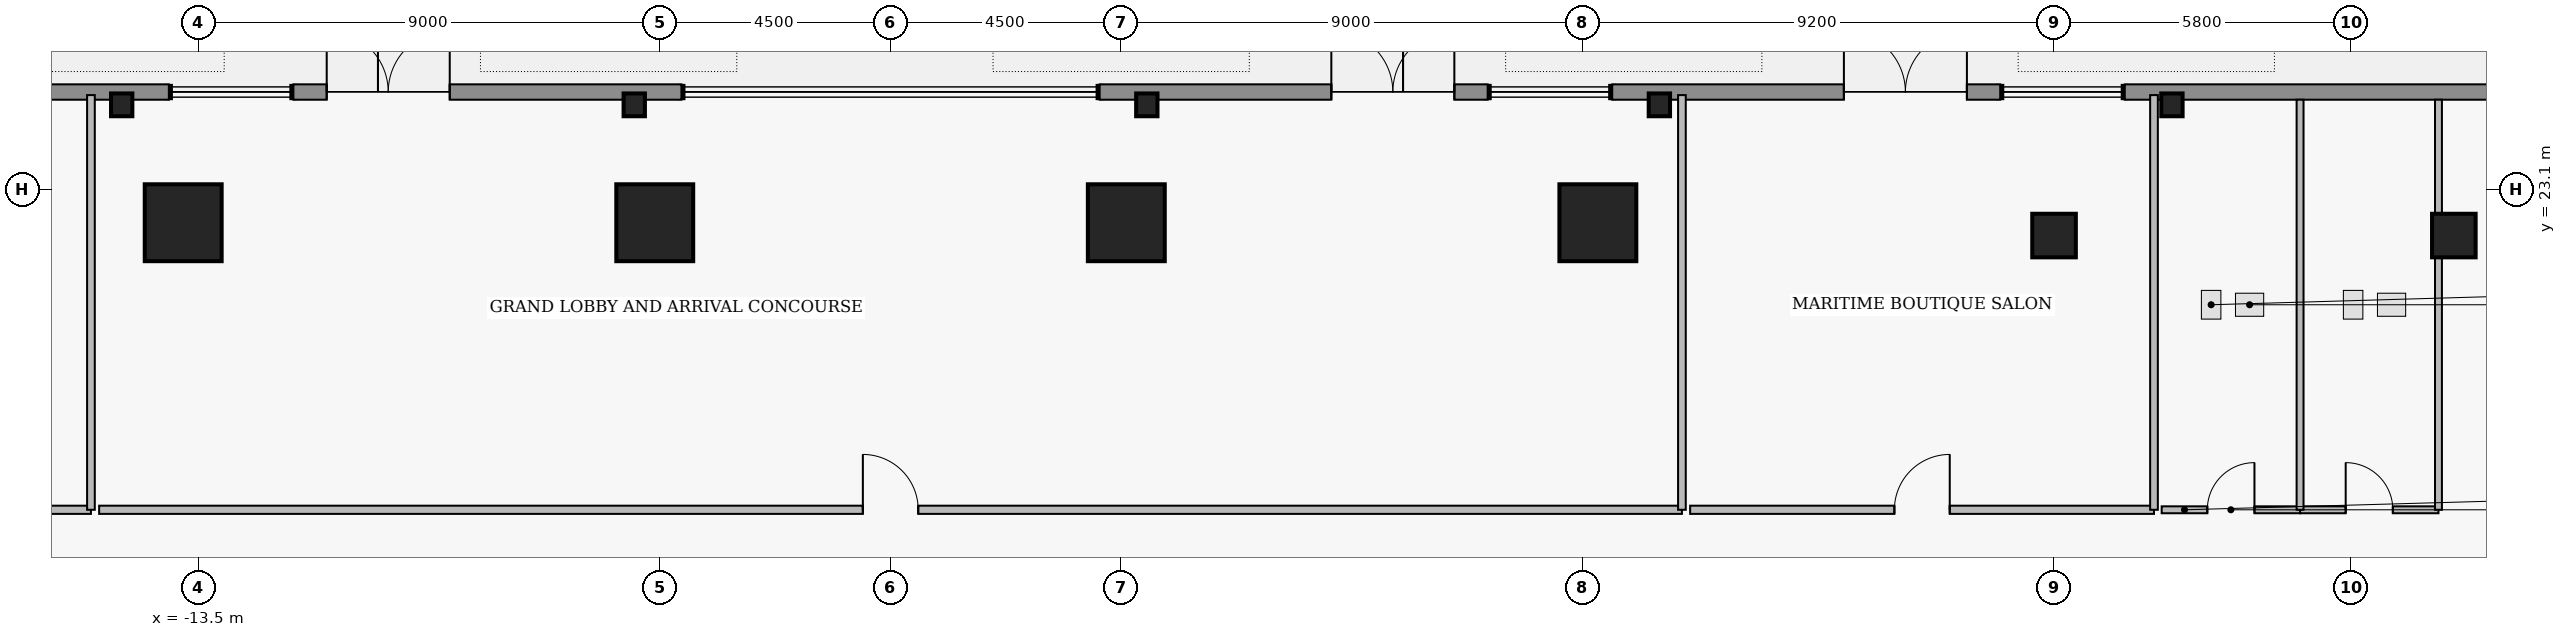
"""IFC4 building model, lengths in metres.
Left out: names, types, materials, properties, quantities, classifications, styles, units other than length and angle.
Written with IfcOpenShell. Run it as: python <this file> out.ifc"""

import sys

from ifc_helpers import new_model, si_unit, direction, frame, frame_2d, origin, origin_2d, place, context, subcontext, project, spatial, rectangle, i_section, extrude, element, fill, save


model = new_model("IFC4")
c1 = context("Model", 3, precision=1e-05, world=origin(), true_north=direction((0.0, 1.0)))
c2 = subcontext(c1, "Body", "Model", "MODEL_VIEW")
j1 = project(units=[si_unit("LENGTHUNIT", "METRE"), si_unit("PLANEANGLEUNIT", "RADIAN")], contexts=[c1])
p1 = place(None, origin())
s1 = spatial("IfcSite", under=j1, at=p1, CompositionType="ELEMENT")
p2 = place(p1, origin())
s2 = spatial("IfcBuilding", under=s1, at=p2, CompositionType="ELEMENT")
p3 = place(p2, origin())
s3 = spatial("IfcBuildingStorey", under=s2, at=p3, CompositionType="ELEMENT", Elevation=0.0)
for number, where, z_axis, x_axis in (
    (1, (-13.8, 22.45, 0.0), (0.0, 0.0, 1.0), (1.0, 0.0, 0.0)),
    (2, (-4.6, 22.45, 0.0), (0.0, 0.0, 1.0), (1.0, 0.0, 0.0)),
    (3, (4.6, 22.45, 0.0), (0.0, 0.0, 1.0), (1.0, 0.0, 0.0)),
    (4, (13.8, 22.45, 0.0), (0.0, 0.0, 1.0), (1.0, 0.0, 0.0)),
):
    element("IfcColumn", number, at=place(p3, frame(where, z_axis=z_axis, x_axis=x_axis)), inside=s3, PredefinedType="COLUMN", context=c2, shape_type="SweptSolid", body=[
        extrude(rectangle(XDim=1.5, YDim=1.5, at=origin_2d()), origin(), (0.0, 0.0, 1.0), 6.0),
    ])
for number, where, z_axis, x_axis in (
    (5, (30.5, 22.2, 0.0), (0.0, 0.0, 1.0), (1.0, 0.0, 0.0)),
    (6, (22.7, 22.2, 0.0), (0.0, 0.0, 1.0), (1.0, 0.0, 0.0)),
):
    element("IfcColumn", number, at=place(p3, frame(where, z_axis=z_axis, x_axis=x_axis)), inside=s3, PredefinedType="COLUMN", context=c2, shape_type="SweptSolid", body=[
        extrude(rectangle(XDim=0.85, YDim=0.85, at=origin_2d()), origin(), (0.0, 0.0, 1.0), 6.0),
    ])
for number, where, z_axis, x_axis in (
    (7, (-15.0, 24.75, -0.27), (0.0, 0.0, 1.0), (1.0, 0.0, 0.0)),
    (8, (-5.0, 24.75, -0.27), (0.0, 0.0, 1.0), (1.0, 0.0, 0.0)),
    (9, (5.0, 24.75, -0.27), (0.0, 0.0, 1.0), (1.0, 0.0, 0.0)),
    (10, (15.0, 24.75, -0.27), (0.0, 0.0, 1.0), (1.0, 0.0, 0.0)),
    (11, (25.0, 24.75, -0.27), (0.0, 0.0, 1.0), (1.0, 0.0, 0.0)),
):
    element("IfcColumn", number, at=place(p3, frame(where, z_axis=z_axis, x_axis=x_axis)), inside=s3, PredefinedType="PILASTER", context=c2, shape_type="SweptSolid", body=[
        extrude(i_section(OverallWidth=0.416, OverallDepth=0.445, WebThickness=0.039, FlangeThickness=0.063, at=origin_2d()), origin(), (0.0, 0.0, 1.0), 6.02),
    ])
p4 = place(p3, frame((-28.35, 25.0, 0.0), z_axis=(0.0, 0.0, 1.0), x_axis=(1.0, 0.0, 0.0)))
e12 = element("IfcWall", 12, at=p4, inside=s3, PredefinedType="STANDARD", context=c2, shape_type="SweptSolid", body=[
    extrude(rectangle(XDim=14.27, YDim=0.3, at=frame_2d((7.135, 0.0))), origin(), (0.0, 0.0, 1.0), 5.75),
])
p5 = place(p4, frame((7.35, 0.0, 0.0)))
e13 = element("IfcOpeningElement", 13, at=p5, cuts=e12, PredefinedType="OPENING", context=c2, shape_type="SweptSolid", body=[
    extrude(rectangle(XDim=2.4, YDim=2.45, at=frame_2d((1.2, 1.225))), frame((0.0, 0.16, 0.0), z_axis=(0.0, -1.0, 0.0), x_axis=(1.0, 0.0, 0.0)), (0.0, 0.0, 1.0), 0.32),
])
p6 = place(p4, frame((4.25, 0.0, 0.9)))
e14 = element("IfcOpeningElement", 14, at=p6, cuts=e12, PredefinedType="OPENING", context=c2, shape_type="SweptSolid", body=[
    extrude(rectangle(XDim=2.4, YDim=2.2, at=frame_2d((1.2, 1.1))), frame((0.0, 0.16, 0.0), z_axis=(0.0, -1.0, 0.0), x_axis=(1.0, 0.0, 0.0)), (0.0, 0.0, 1.0), 0.32),
])
p7 = place(p3, frame((-11.65, 25.0, 0.0), z_axis=(0.0, 0.0, 1.0), x_axis=(1.0, 0.0, 0.0)))
e15 = element("IfcWall", 15, at=p7, inside=s3, PredefinedType="STANDARD", context=c2, shape_type="SweptSolid", body=[
    extrude(rectangle(XDim=7.57, YDim=0.3, at=frame_2d((3.785, 0.0))), origin(), (0.0, 0.0, 1.0), 5.75),
])
p8 = place(p7, frame((0.65, 0.0, 0.0)))
e16 = element("IfcOpeningElement", 16, at=p8, cuts=e15, PredefinedType="OPENING", context=c2, shape_type="SweptSolid", body=[
    extrude(rectangle(XDim=2.4, YDim=2.45, at=frame_2d((1.2, 1.225))), frame((0.0, 0.16, 0.0), z_axis=(0.0, -1.0, 0.0), x_axis=(1.0, 0.0, 0.0)), (0.0, 0.0, 1.0), 0.32),
])
p9 = place(p3, frame((4.08, 25.0, 0.0), z_axis=(0.0, 0.0, 1.0), x_axis=(1.0, 0.0, 0.0)))
e17 = element("IfcWall", 17, at=p9, inside=s3, PredefinedType="STANDARD", context=c2, shape_type="SweptSolid", body=[
    extrude(rectangle(XDim=7.57, YDim=0.3, at=frame_2d((3.785, 0.0))), origin(), (0.0, 0.0, 1.0), 5.75),
])
p10 = place(p9, frame((4.52, 0.0, 0.0)))
e18 = element("IfcOpeningElement", 18, at=p10, cuts=e17, PredefinedType="OPENING", context=c2, shape_type="SweptSolid", body=[
    extrude(rectangle(XDim=2.4, YDim=2.45, at=frame_2d((1.2, 1.225))), frame((0.0, 0.16, 0.0), z_axis=(0.0, -1.0, 0.0), x_axis=(1.0, 0.0, 0.0)), (0.0, 0.0, 1.0), 0.32),
])
p11 = place(p3, frame((14.08, 25.0, 0.0), z_axis=(0.0, 0.0, 1.0), x_axis=(1.0, 0.0, 0.0)))
e19 = element("IfcWall", 19, at=p11, inside=s3, PredefinedType="STANDARD", context=c2, shape_type="SweptSolid", body=[
    extrude(rectangle(XDim=7.57, YDim=0.3, at=frame_2d((3.785, 0.0))), origin(), (0.0, 0.0, 1.0), 5.75),
])
p12 = place(p11, frame((4.52, 0.0, 0.0)))
e20 = element("IfcOpeningElement", 20, at=p12, cuts=e19, PredefinedType="OPENING", context=c2, shape_type="SweptSolid", body=[
    extrude(rectangle(XDim=2.4, YDim=2.45, at=frame_2d((1.2, 1.225))), frame((0.0, 0.16, 0.0), z_axis=(0.0, -1.0, 0.0), x_axis=(1.0, 0.0, 0.0)), (0.0, 0.0, 1.0), 0.32),
])
p13 = place(p3, frame((24.08, 25.0, 0.0), z_axis=(0.0, 0.0, 1.0), x_axis=(1.0, 0.0, 0.0)))
e21 = element("IfcWall", 21, at=p13, inside=s3, PredefinedType="STANDARD", context=c2, shape_type="SweptSolid", body=[
    extrude(rectangle(XDim=7.92, YDim=0.3, at=frame_2d((3.96, 0.0))), origin(), (0.0, 0.0, 1.0), 5.75),
])
p14 = place(p3, frame((-27.9, 16.85, 0.0), z_axis=(0.0, 0.0, 1.0), x_axis=(1.0, 0.0, 0.0)))
e22 = element("IfcWall", 22, at=p14, inside=s3, PredefinedType="PARTITIONING", context=c2, shape_type="SweptSolid", body=[
    extrude(rectangle(XDim=12.3, YDim=0.16, at=frame_2d((6.15, 0.0))), origin(), (0.0, 0.0, 1.0), 5.75),
])
p15 = place(p14, frame((7.01, 0.0, 0.0)))
e23 = element("IfcOpeningElement", 23, at=p15, cuts=e22, PredefinedType="OPENING", context=c2, shape_type="SweptSolid", body=[
    extrude(rectangle(XDim=1.08, YDim=2.18, at=frame_2d((0.54, 1.09))), frame((0.0, 0.09, 0.0), z_axis=(0.0, -1.0, 0.0), x_axis=(1.0, 0.0, 0.0)), (0.0, 0.0, 1.0), 0.18),
])
p16 = place(p3, frame((-15.44, 16.85, 0.0), z_axis=(0.0, 0.0, 1.0), x_axis=(1.0, 0.0, 0.0)))
e24 = element("IfcWall", 24, at=p16, inside=s3, PredefinedType="PARTITIONING", context=c2, shape_type="SweptSolid", body=[
    extrude(rectangle(XDim=30.88, YDim=0.16, at=frame_2d((15.44, 0.0))), origin(), (0.0, 0.0, 1.0), 5.217),
])
p17 = place(p16, frame((14.9, 0.0, 0.0)))
e25 = element("IfcOpeningElement", 25, at=p17, cuts=e24, PredefinedType="OPENING", context=c2, shape_type="SweptSolid", body=[
    extrude(rectangle(XDim=1.08, YDim=2.18, at=frame_2d((0.54, 1.09))), frame((0.0, 0.09, 0.0), z_axis=(0.0, -1.0, 0.0), x_axis=(1.0, 0.0, 0.0)), (0.0, 0.0, 1.0), 0.18),
])
p18 = place(p3, frame((15.6, 16.85, 0.0), z_axis=(0.0, 0.0, 1.0), x_axis=(1.0, 0.0, 0.0)))
e26 = element("IfcWall", 26, at=p18, inside=s3, PredefinedType="PARTITIONING", context=c2, shape_type="SweptSolid", body=[
    extrude(rectangle(XDim=9.05, YDim=0.16, at=frame_2d((4.525, 0.0))), origin(), (0.0, 0.0, 1.0), 5.75),
])
p19 = place(p18, frame((3.985, 0.0, 0.0)))
e27 = element("IfcOpeningElement", 27, at=p19, cuts=e26, PredefinedType="OPENING", context=c2, shape_type="SweptSolid", body=[
    extrude(rectangle(XDim=1.08, YDim=2.18, at=frame_2d((0.54, 1.09))), frame((0.0, 0.09, 0.0), z_axis=(0.0, -1.0, 0.0), x_axis=(1.0, 0.0, 0.0)), (0.0, 0.0, 1.0), 0.18),
])
p20 = place(p3, frame((24.8, 16.85, 0.0), z_axis=(0.0, 0.0, 1.0), x_axis=(1.0, 0.0, 0.0)))
e28 = element("IfcWall", 28, at=p20, inside=s3, PredefinedType="PLUMBINGWALL", context=c2, shape_type="SweptSolid", body=[
    extrude(rectangle(XDim=2.7, YDim=0.135, at=frame_2d((1.35, 0.0))), origin(), (0.0, 0.0, 1.0), 5.75),
])
p21 = place(p20, frame((0.89, 0.0, 0.0)))
e29 = element("IfcOpeningElement", 29, at=p21, cuts=e28, PredefinedType="OPENING", context=c2, shape_type="SweptSolid", body=[
    extrude(rectangle(XDim=0.92, YDim=2.12, at=frame_2d((0.46, 1.06))), frame((0.0, 0.077, 0.0), z_axis=(0.0, -1.0, 0.0), x_axis=(1.0, 0.0, 0.0)), (0.0, 0.0, 1.0), 0.155),
])
p22 = place(p3, frame((27.5, 16.85, 0.0), z_axis=(0.0, 0.0, 1.0), x_axis=(1.0, 0.0, 0.0)))
e30 = element("IfcWall", 30, at=p22, inside=s3, PredefinedType="PLUMBINGWALL", context=c2, shape_type="SweptSolid", body=[
    extrude(rectangle(XDim=2.7, YDim=0.135, at=frame_2d((1.35, 0.0))), origin(), (0.0, 0.0, 1.0), 5.75),
])
p23 = place(p22, frame((0.89, 0.0, 0.0)))
e31 = element("IfcOpeningElement", 31, at=p23, cuts=e30, PredefinedType="OPENING", context=c2, shape_type="SweptSolid", body=[
    extrude(rectangle(XDim=0.92, YDim=2.12, at=frame_2d((0.46, 1.06))), frame((0.0, 0.077, 0.0), z_axis=(0.0, -1.0, 0.0), x_axis=(1.0, 0.0, 0.0)), (0.0, 0.0, 1.0), 0.155),
])
for number, where, z_axis, x_axis in (
    (32, (-15.6, 16.85, 0.0), (0.0, 0.0, 1.0), (0.0, 1.0, 0.0)),
    (33, (15.44, 16.85, 0.0), (0.0, 0.0, 1.0), (0.0, 1.0, 0.0)),
    (34, (24.65, 16.85, 0.0), (0.0, 0.0, 1.0), (0.0, 1.0, 0.0)),
):
    element("IfcWall", number, at=place(p3, frame(where, z_axis=z_axis, x_axis=x_axis)), inside=s3, PredefinedType="PARTITIONING", context=c2, shape_type="SweptSolid", body=[
        extrude(rectangle(XDim=8.09, YDim=0.15, at=frame_2d((4.045, 0.0))), origin(), (0.0, 0.0, 1.0), 5.75),
    ])
for number, where, z_axis, x_axis in (
    (35, (30.2, 16.85, 0.0), (0.0, 0.0, 1.0), (0.0, 1.0, 0.0)),
    (36, (27.5, 16.85, 0.0), (0.0, 0.0, 1.0), (0.0, 1.0, 0.0)),
):
    element("IfcWall", number, at=place(p3, frame(where, z_axis=z_axis, x_axis=x_axis)), inside=s3, PredefinedType="PLUMBINGWALL", context=c2, shape_type="SweptSolid", body=[
        extrude(rectangle(XDim=8.0, YDim=0.135, at=frame_2d((4.0, 0.0))), origin(), (0.0, 0.0, 1.0), 5.75),
    ])
p24 = place(p8, origin())
e37 = element("IfcDoor", 37, at=p24, inside=s3, OperationType="DOUBLE_DOOR_SINGLE_SWING", PredefinedType="DOOR", context=c2, shape_type="SweptSolid", body=[
    extrude(rectangle(XDim=2.4, YDim=2.45, at=frame_2d((1.2, 1.225))), frame((0.0, 0.025, 0.0), z_axis=(0.0, -1.0, 0.0), x_axis=(1.0, 0.0, 0.0)), (0.0, 0.0, 1.0), 0.05),
])
fill(e16, e37)
p25 = place(p10, origin())
e38 = element("IfcDoor", 38, at=p25, inside=s3, OperationType="DOUBLE_DOOR_SINGLE_SWING", PredefinedType="DOOR", context=c2, shape_type="SweptSolid", body=[
    extrude(rectangle(XDim=2.4, YDim=2.45, at=frame_2d((1.2, 1.225))), frame((0.0, 0.025, 0.0), z_axis=(0.0, -1.0, 0.0), x_axis=(1.0, 0.0, 0.0)), (0.0, 0.0, 1.0), 0.05),
])
fill(e18, e38)
p26 = place(p12, origin())
e39 = element("IfcDoor", 39, at=p26, inside=s3, OperationType="DOUBLE_DOOR_SINGLE_SWING", PredefinedType="DOOR", context=c2, shape_type="SweptSolid", body=[
    extrude(rectangle(XDim=2.4, YDim=2.45, at=frame_2d((1.2, 1.225))), frame((0.0, 0.025, 0.0), z_axis=(0.0, -1.0, 0.0), x_axis=(1.0, 0.0, 0.0)), (0.0, 0.0, 1.0), 0.05),
])
fill(e20, e39)
p27 = place(p17, origin())
e40 = element("IfcDoor", 40, at=p27, inside=s3, OperationType="SINGLE_SWING_LEFT", PredefinedType="DOOR", context=c2, shape_type="SweptSolid", body=[
    extrude(rectangle(XDim=1.08, YDim=2.18, at=frame_2d((0.54, 1.09))), frame((0.0, 0.025, 0.0), z_axis=(0.0, -1.0, 0.0), x_axis=(1.0, 0.0, 0.0)), (0.0, 0.0, 1.0), 0.05),
])
fill(e25, e40)
p28 = place(p19, origin())
e41 = element("IfcDoor", 41, at=p28, inside=s3, OperationType="SINGLE_SWING_RIGHT", PredefinedType="DOOR", context=c2, shape_type="SweptSolid", body=[
    extrude(rectangle(XDim=1.08, YDim=2.18, at=frame_2d((0.54, 1.09))), frame((0.0, 0.025, 0.0), z_axis=(0.0, -1.0, 0.0), x_axis=(1.0, 0.0, 0.0)), (0.0, 0.0, 1.0), 0.05),
])
fill(e27, e41)
p29 = place(p21, origin())
e42 = element("IfcDoor", 42, at=p29, inside=s3, OperationType="SINGLE_SWING_RIGHT", PredefinedType="DOOR", context=c2, shape_type="SweptSolid", body=[
    extrude(rectangle(XDim=0.92, YDim=2.12, at=frame_2d((0.46, 1.06))), frame((0.0, 0.025, 0.0), z_axis=(0.0, -1.0, 0.0), x_axis=(1.0, 0.0, 0.0)), (0.0, 0.0, 1.0), 0.05),
])
fill(e29, e42)
p30 = place(p23, origin())
e43 = element("IfcDoor", 43, at=p30, inside=s3, OperationType="SINGLE_SWING_LEFT", PredefinedType="DOOR", context=c2, shape_type="SweptSolid", body=[
    extrude(rectangle(XDim=0.92, YDim=2.12, at=frame_2d((0.46, 1.06))), frame((0.0, 0.025, 0.0), z_axis=(0.0, -1.0, 0.0), x_axis=(1.0, 0.0, 0.0)), (0.0, 0.0, 1.0), 0.05),
])
fill(e31, e43)
save(model, sys.argv[1])
